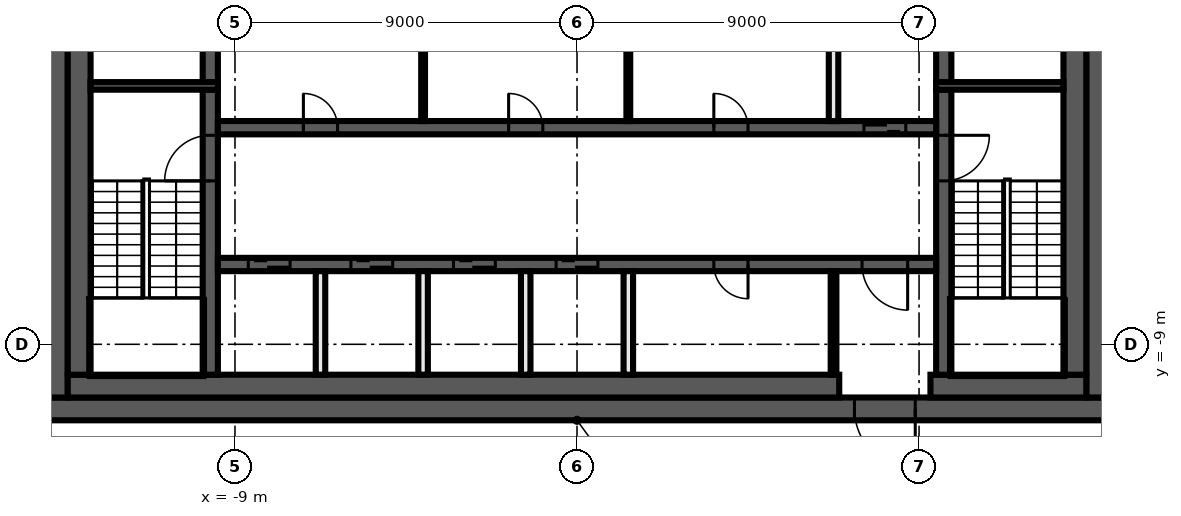
"""IFC4 building model, lengths in metres.
Left out: names, types, materials, properties, quantities, classifications, styles, units other than length and angle.
Written with IfcOpenShell. Run it as: python <this file> out.ifc"""

import sys

from ifc_helpers import new_model, si_unit, direction, frame, frame_2d, origin, place, context, subcontext, project, spatial, rectangle, extrude, element, fill, save


model = new_model("IFC4")
c1 = context("Model", 3, precision=1e-05, world=origin(), true_north=direction((0.0, 1.0)))
c2 = subcontext(c1, "Body", "Model", "MODEL_VIEW")
j1 = project(units=[si_unit("LENGTHUNIT", "METRE"), si_unit("PLANEANGLEUNIT", "RADIAN")], contexts=[c1])
p1 = place(None, origin())
s1 = spatial("IfcSite", under=j1, at=p1, CompositionType="ELEMENT")
p2 = place(p1, origin())
s2 = spatial("IfcBuilding", under=s1, at=p2, CompositionType="ELEMENT")
p3 = place(p2, frame((0.0, 0.0, 327.8)))
s3 = spatial("IfcBuildingStorey", under=s2, at=p3, CompositionType="ELEMENT", Elevation=327.8)
p4 = place(p3, frame((14.0, -10.7, 0.0), z_axis=(0.0, 0.0, 1.0), x_axis=(-1.0, 0.0, 0.0)))
e1 = element("IfcWall", 1, at=p4, inside=s3, PredefinedType="SHEAR", context=c2, shape_type="SweptSolid", body=[
    extrude(rectangle(XDim=28.0, YDim=0.6, at=frame_2d((14.0, 0.0))), origin(), (0.0, 0.0, 1.0), 3.82),
])
p5 = place(p4, frame((5.1, 0.0, 0.0)))
e2 = element("IfcOpeningElement", 2, at=p5, cuts=e1, PredefinedType="OPENING", context=c2, shape_type="SweptSolid", body=[
    extrude(rectangle(XDim=1.6, YDim=2.1, at=frame_2d((0.8, 1.05))), frame((0.0, 0.31, 0.0), z_axis=(0.0, -1.0, 0.0), x_axis=(1.0, 0.0, 0.0)), (0.0, 0.0, 1.0), 0.62),
])
for number, where, z_axis, x_axis in (
    (3, (13.7, 10.4, 0.0), (0.0, 0.0, 1.0), (0.0, -1.0, 0.0)),
    (4, (-13.7, -10.4, 0.0), (0.0, 0.0, 1.0), (0.0, 1.0, 0.0)),
):
    element("IfcWall", number, at=place(p3, frame(where, z_axis=z_axis, x_axis=x_axis)), inside=s3, PredefinedType="SHEAR", context=c2, shape_type="SweptSolid", body=[
        extrude(rectangle(XDim=20.8, YDim=0.6, at=frame_2d((10.4, 0.0))), origin(), (0.0, 0.0, 1.0), 3.82),
    ])
p6 = place(p3, frame((13.4, -10.1, 0.0), z_axis=(0.0, 0.0, 1.0), x_axis=(-1.0, 0.0, 0.0)))
e5 = element("IfcWall", 5, at=p6, inside=s3, PredefinedType="SHEAR", context=c2, shape_type="SweptSolid", body=[
    extrude(rectangle(XDim=4.1, YDim=0.6, at=frame_2d((2.05, 0.0))), origin(), (0.0, 0.0, 1.0), 3.82),
])
p7 = place(p3, frame((6.9, -10.1, 0.0), z_axis=(0.0, 0.0, 1.0), x_axis=(-1.0, 0.0, 0.0)))
e6 = element("IfcWall", 6, at=p7, inside=s3, PredefinedType="SHEAR", context=c2, shape_type="SweptSolid", body=[
    extrude(rectangle(XDim=20.3, YDim=0.6, at=frame_2d((10.15, 0.0))), origin(), (0.0, 0.0, 1.0), 3.82),
])
for number, where, z_axis, x_axis in (
    (7, (13.1, 9.8, 0.0), (0.0, 0.0, 1.0), (0.0, -1.0, 0.0)),
    (8, (-13.1, -9.8, 0.0), (0.0, 0.0, 1.0), (0.0, 1.0, 0.0)),
):
    element("IfcWall", number, at=place(p3, frame(where, z_axis=z_axis, x_axis=x_axis)), inside=s3, PredefinedType="SHEAR", context=c2, shape_type="SweptSolid", body=[
        extrude(rectangle(XDim=19.6, YDim=0.6, at=frame_2d((9.8, 0.0))), origin(), (0.0, 0.0, 1.0), 3.82),
    ])
p8 = place(p3, frame((9.65, -2.3, 0.0), z_axis=(0.0, 0.0, 1.0), x_axis=(0.0, -1.0, 0.0)))
e9 = element("IfcWall", 9, at=p8, inside=s3, PredefinedType="SHEAR", context=c2, shape_type="SweptSolid", body=[
    extrude(rectangle(XDim=7.5, YDim=0.4, at=frame_2d((3.75, 0.0))), origin(), (0.0, 0.0, 1.0), 3.82),
])
p9 = place(p8, frame((1.2, 0.0, 0.0)))
e10 = element("IfcOpeningElement", 10, at=p9, cuts=e9, PredefinedType="OPENING", context=c2, shape_type="SweptSolid", body=[
    extrude(rectangle(XDim=1.2, YDim=2.1, at=frame_2d((0.6, 1.05))), frame((0.0, 0.21, 0.0), z_axis=(0.0, -1.0, 0.0), x_axis=(1.0, 0.0, 0.0)), (0.0, 0.0, 1.0), 0.42),
])
p10 = place(p3, frame((9.65, 2.1, 0.0), z_axis=(0.0, 0.0, 1.0), x_axis=(0.0, -1.0, 0.0)))
e11 = element("IfcWall", 11, at=p10, inside=s3, PredefinedType="SHEAR", context=c2, shape_type="SweptSolid", body=[
    extrude(rectangle(XDim=4.2, YDim=0.4, at=frame_2d((2.1, 0.0))), origin(), (0.0, 0.0, 1.0), 3.82),
])
p11 = place(p10, frame((0.15, 0.0, 0.0)))
e12 = element("IfcOpeningElement", 12, at=p11, cuts=e11, PredefinedType="OPENING", context=c2, shape_type="SweptSolid", body=[
    extrude(rectangle(XDim=0.9, YDim=2.1, at=frame_2d((0.45, 1.05))), frame((0.0, 0.21, 0.0), z_axis=(0.0, -1.0, 0.0), x_axis=(1.0, 0.0, 0.0)), (0.0, 0.0, 1.0), 0.42),
])
p12 = place(p3, frame((-9.65, -9.8, 0.0), z_axis=(0.0, 0.0, 1.0), x_axis=(0.0, 1.0, 0.0)))
e13 = element("IfcWall", 13, at=p12, inside=s3, PredefinedType="SHEAR", context=c2, shape_type="SweptSolid", body=[
    extrude(rectangle(XDim=7.5, YDim=0.4, at=frame_2d((3.75, 0.0))), origin(), (0.0, 0.0, 1.0), 3.82),
])
p13 = place(p12, frame((5.1, 0.0, 0.0)))
e14 = element("IfcOpeningElement", 14, at=p13, cuts=e13, PredefinedType="OPENING", context=c2, shape_type="SweptSolid", body=[
    extrude(rectangle(XDim=1.2, YDim=2.1, at=frame_2d((0.6, 1.05))), frame((0.0, 0.21, 0.0), z_axis=(0.0, -1.0, 0.0), x_axis=(1.0, 0.0, 0.0)), (0.0, 0.0, 1.0), 0.42),
])
p14 = place(p3, frame((-9.65, -2.1, 0.0), z_axis=(0.0, 0.0, 1.0), x_axis=(0.0, 1.0, 0.0)))
e15 = element("IfcWall", 15, at=p14, inside=s3, PredefinedType="SHEAR", context=c2, shape_type="SweptSolid", body=[
    extrude(rectangle(XDim=4.2, YDim=0.4, at=frame_2d((2.1, 0.0))), origin(), (0.0, 0.0, 1.0), 3.82),
])
for number, where, z_axis, x_axis in (
    (16, (9.45, -2.2, 0.0), (0.0, 0.0, 1.0), (1.0, 0.0, 0.0)),
    (17, (-9.45, -2.2, 0.0), (0.0, 0.0, 1.0), (-1.0, 0.0, 0.0)),
):
    element("IfcWall", number, at=place(p3, frame(where, z_axis=z_axis, x_axis=x_axis)), inside=s3, PredefinedType="SHEAR", context=c2, shape_type="SweptSolid", body=[
        extrude(rectangle(XDim=3.35, YDim=0.2, at=frame_2d((1.675, 0.0))), origin(), (0.0, 0.0, 1.0), 3.82),
    ])
p15 = place(p3, frame((-9.45, -3.3, 0.0), z_axis=(0.0, 0.0, 1.0), x_axis=(1.0, 0.0, 0.0)))
e18 = element("IfcWall", 18, at=p15, inside=s3, PredefinedType="SHEAR", context=c2, shape_type="SweptSolid", body=[
    extrude(rectangle(XDim=18.9, YDim=0.35, at=frame_2d((9.45, 0.0))), origin(), (0.0, 0.0, 1.0), 3.82),
])
p16 = place(p15, frame((17.0, 0.0, 0.0)))
e19 = element("IfcOpeningElement", 19, at=p16, cuts=e18, PredefinedType="OPENING", context=c2, shape_type="SweptSolid", body=[
    extrude(rectangle(XDim=1.1, YDim=2.1, at=frame_2d((0.55, 1.05))), frame((0.0, 0.185, 0.0), z_axis=(0.0, -1.0, 0.0), x_axis=(1.0, 0.0, 0.0)), (0.0, 0.0, 1.0), 0.37),
])
p17 = place(p15, frame((2.25, 0.0, 0.0)))
e20 = element("IfcOpeningElement", 20, at=p17, cuts=e18, PredefinedType="OPENING", context=c2, shape_type="SweptSolid", body=[
    extrude(rectangle(XDim=0.9, YDim=2.1, at=frame_2d((0.45, 1.05))), frame((0.0, 0.185, 0.0), z_axis=(0.0, -1.0, 0.0), x_axis=(1.0, 0.0, 0.0)), (0.0, 0.0, 1.0), 0.37),
])
p18 = place(p15, frame((7.65, 0.0, 0.0)))
e21 = element("IfcOpeningElement", 21, at=p18, cuts=e18, PredefinedType="OPENING", context=c2, shape_type="SweptSolid", body=[
    extrude(rectangle(XDim=0.9, YDim=2.1, at=frame_2d((0.45, 1.05))), frame((0.0, 0.185, 0.0), z_axis=(0.0, -1.0, 0.0), x_axis=(1.0, 0.0, 0.0)), (0.0, 0.0, 1.0), 0.37),
])
p19 = place(p15, frame((13.05, 0.0, 0.0)))
e22 = element("IfcOpeningElement", 22, at=p19, cuts=e18, PredefinedType="OPENING", context=c2, shape_type="SweptSolid", body=[
    extrude(rectangle(XDim=0.9, YDim=2.1, at=frame_2d((0.45, 1.05))), frame((0.0, 0.185, 0.0), z_axis=(0.0, -1.0, 0.0), x_axis=(1.0, 0.0, 0.0)), (0.0, 0.0, 1.0), 0.37),
])
p20 = place(p3, frame((9.45, -6.9, 0.0), z_axis=(0.0, 0.0, 1.0), x_axis=(-1.0, 0.0, 0.0)))
e23 = element("IfcWall", 23, at=p20, inside=s3, PredefinedType="SHEAR", context=c2, shape_type="SweptSolid", body=[
    extrude(rectangle(XDim=18.9, YDim=0.35, at=frame_2d((9.45, 0.0))), origin(), (0.0, 0.0, 1.0), 3.82),
])
p21 = place(p20, frame((17.0, 0.0, 0.0)))
e24 = element("IfcOpeningElement", 24, at=p21, cuts=e23, PredefinedType="OPENING", context=c2, shape_type="SweptSolid", body=[
    extrude(rectangle(XDim=1.1, YDim=2.1, at=frame_2d((0.55, 1.05))), frame((0.0, 0.185, 0.0), z_axis=(0.0, -1.0, 0.0), x_axis=(1.0, 0.0, 0.0)), (0.0, 0.0, 1.0), 0.37),
])
p22 = place(p20, frame((14.3, 0.0, 0.0)))
e25 = element("IfcOpeningElement", 25, at=p22, cuts=e23, PredefinedType="OPENING", context=c2, shape_type="SweptSolid", body=[
    extrude(rectangle(XDim=1.1, YDim=2.1, at=frame_2d((0.55, 1.05))), frame((0.0, 0.185, 0.0), z_axis=(0.0, -1.0, 0.0), x_axis=(1.0, 0.0, 0.0)), (0.0, 0.0, 1.0), 0.37),
])
p23 = place(p20, frame((11.6, 0.0, 0.0)))
e26 = element("IfcOpeningElement", 26, at=p23, cuts=e23, PredefinedType="OPENING", context=c2, shape_type="SweptSolid", body=[
    extrude(rectangle(XDim=1.1, YDim=2.1, at=frame_2d((0.55, 1.05))), frame((0.0, 0.185, 0.0), z_axis=(0.0, -1.0, 0.0), x_axis=(1.0, 0.0, 0.0)), (0.0, 0.0, 1.0), 0.37),
])
p24 = place(p20, frame((8.9, 0.0, 0.0)))
e27 = element("IfcOpeningElement", 27, at=p24, cuts=e23, PredefinedType="OPENING", context=c2, shape_type="SweptSolid", body=[
    extrude(rectangle(XDim=1.1, YDim=2.1, at=frame_2d((0.55, 1.05))), frame((0.0, 0.185, 0.0), z_axis=(0.0, -1.0, 0.0), x_axis=(1.0, 0.0, 0.0)), (0.0, 0.0, 1.0), 0.37),
])
p25 = place(p20, frame((0.75, 0.0, 0.0)))
e28 = element("IfcOpeningElement", 28, at=p25, cuts=e23, PredefinedType="OPENING", context=c2, shape_type="SweptSolid", body=[
    extrude(rectangle(XDim=1.2, YDim=2.1, at=frame_2d((0.6, 1.05))), frame((0.0, 0.185, 0.0), z_axis=(0.0, -1.0, 0.0), x_axis=(1.0, 0.0, 0.0)), (0.0, 0.0, 1.0), 0.37),
])
p26 = place(p20, frame((4.95, 0.0, 0.0)))
e29 = element("IfcOpeningElement", 29, at=p26, cuts=e23, PredefinedType="OPENING", context=c2, shape_type="SweptSolid", body=[
    extrude(rectangle(XDim=0.9, YDim=2.1, at=frame_2d((0.45, 1.05))), frame((0.0, 0.185, 0.0), z_axis=(0.0, -1.0, 0.0), x_axis=(1.0, 0.0, 0.0)), (0.0, 0.0, 1.0), 0.37),
])
p27 = place(p3, frame((6.75, -9.8, 0.0), z_axis=(0.0, 0.0, 1.0), x_axis=(0.0, 1.0, 0.0)))
e30 = element("IfcWall", 30, at=p27, inside=s3, PredefinedType="PARTITIONING", context=c2, shape_type="SweptSolid", body=[
    extrude(rectangle(XDim=2.725, YDim=0.15, at=frame_2d((1.363, 0.0))), origin(), (0.0, 0.0, 1.0), 3.82),
])
p28 = place(p3, frame((6.75, -3.125, 0.0), z_axis=(0.0, 0.0, 1.0), x_axis=(0.0, 1.0, 0.0)))
e31 = element("IfcWall", 31, at=p28, inside=s3, PredefinedType="SOLIDWALL", context=c2, shape_type="SweptSolid", body=[
    extrude(rectangle(XDim=2.725, YDim=0.25, at=frame_2d((1.363, 0.0))), origin(), (0.0, 0.0, 1.0), 3.82),
])
p29 = place(p3, frame((1.35, -3.125, 0.0), z_axis=(0.0, 0.0, 1.0), x_axis=(0.0, 1.0, 0.0)))
e32 = element("IfcWall", 32, at=p29, inside=s3, PredefinedType="PARTITIONING", context=c2, shape_type="SweptSolid", body=[
    extrude(rectangle(XDim=2.725, YDim=0.1, at=frame_2d((1.363, 0.0))), origin(), (0.0, 0.0, 1.0), 3.82),
])
for number, where, z_axis, x_axis in (
    (33, (1.35, -9.8, 0.0), (0.0, 0.0, 1.0), (0.0, 1.0, 0.0)),
    (34, (-1.35, -9.8, 0.0), (0.0, 0.0, 1.0), (0.0, 1.0, 0.0)),
):
    element("IfcWall", number, at=place(p3, frame(where, z_axis=z_axis, x_axis=x_axis)), inside=s3, PredefinedType="SOLIDWALL", context=c2, shape_type="SweptSolid", body=[
        extrude(rectangle(XDim=2.725, YDim=0.25, at=frame_2d((1.363, 0.0))), origin(), (0.0, 0.0, 1.0), 3.82),
    ])
p30 = place(p3, frame((-4.05, -3.125, 0.0), z_axis=(0.0, 0.0, 1.0), x_axis=(0.0, 1.0, 0.0)))
e35 = element("IfcWall", 35, at=p30, inside=s3, PredefinedType="PARTITIONING", context=c2, shape_type="SweptSolid", body=[
    extrude(rectangle(XDim=2.725, YDim=0.1, at=frame_2d((1.363, 0.0))), origin(), (0.0, 0.0, 1.0), 3.82),
])
for number, where, z_axis, x_axis in (
    (36, (-4.05, -9.8, 0.0), (0.0, 0.0, 1.0), (0.0, 1.0, 0.0)),
    (37, (-6.75, -9.8, 0.0), (0.0, 0.0, 1.0), (0.0, 1.0, 0.0)),
):
    element("IfcWall", number, at=place(p3, frame(where, z_axis=z_axis, x_axis=x_axis)), inside=s3, PredefinedType="SOLIDWALL", context=c2, shape_type="SweptSolid", body=[
        extrude(rectangle(XDim=2.725, YDim=0.25, at=frame_2d((1.363, 0.0))), origin(), (0.0, 0.0, 1.0), 3.82),
    ])
p31 = place(p16, origin())
e38 = element("IfcDoor", 38, at=p31, inside=s3, OperationType="DOUBLE_DOOR_SLIDING", PredefinedType="DOOR", context=c2, shape_type="SweptSolid", body=[
    extrude(rectangle(XDim=1.1, YDim=2.1, at=frame_2d((0.55, 1.05))), frame((0.0, 0.025, 0.0), z_axis=(0.0, -1.0, 0.0), x_axis=(1.0, 0.0, 0.0)), (0.0, 0.0, 1.0), 0.05),
])
fill(e19, e38)
p32 = place(p21, origin())
e39 = element("IfcDoor", 39, at=p32, inside=s3, OperationType="DOUBLE_DOOR_SLIDING", PredefinedType="DOOR", context=c2, shape_type="SweptSolid", body=[
    extrude(rectangle(XDim=1.1, YDim=2.1, at=frame_2d((0.55, 1.05))), frame((0.0, 0.025, 0.0), z_axis=(0.0, -1.0, 0.0), x_axis=(1.0, 0.0, 0.0)), (0.0, 0.0, 1.0), 0.05),
])
fill(e24, e39)
p33 = place(p22, origin())
e40 = element("IfcDoor", 40, at=p33, inside=s3, OperationType="DOUBLE_DOOR_SLIDING", PredefinedType="DOOR", context=c2, shape_type="SweptSolid", body=[
    extrude(rectangle(XDim=1.1, YDim=2.1, at=frame_2d((0.55, 1.05))), frame((0.0, 0.025, 0.0), z_axis=(0.0, -1.0, 0.0), x_axis=(1.0, 0.0, 0.0)), (0.0, 0.0, 1.0), 0.05),
])
fill(e25, e40)
p34 = place(p23, origin())
e41 = element("IfcDoor", 41, at=p34, inside=s3, OperationType="DOUBLE_DOOR_SLIDING", PredefinedType="DOOR", context=c2, shape_type="SweptSolid", body=[
    extrude(rectangle(XDim=1.1, YDim=2.1, at=frame_2d((0.55, 1.05))), frame((0.0, 0.025, 0.0), z_axis=(0.0, -1.0, 0.0), x_axis=(1.0, 0.0, 0.0)), (0.0, 0.0, 1.0), 0.05),
])
fill(e26, e41)
p35 = place(p24, origin())
e42 = element("IfcDoor", 42, at=p35, inside=s3, OperationType="DOUBLE_DOOR_SLIDING", PredefinedType="DOOR", context=c2, shape_type="SweptSolid", body=[
    extrude(rectangle(XDim=1.1, YDim=2.1, at=frame_2d((0.55, 1.05))), frame((0.0, 0.025, 0.0), z_axis=(0.0, -1.0, 0.0), x_axis=(1.0, 0.0, 0.0)), (0.0, 0.0, 1.0), 0.05),
])
fill(e27, e42)
p36 = place(p5, origin())
e43 = element("IfcDoor", 43, at=p36, inside=s3, OperationType="DOUBLE_DOOR_SINGLE_SWING", PredefinedType="DOOR", context=c2, shape_type="SweptSolid", body=[
    extrude(rectangle(XDim=1.6, YDim=2.1, at=frame_2d((0.8, 1.05))), frame((0.0, 0.025, 0.0), z_axis=(0.0, -1.0, 0.0), x_axis=(1.0, 0.0, 0.0)), (0.0, 0.0, 1.0), 0.05),
])
fill(e2, e43)
p37 = place(p25, origin())
e44 = element("IfcDoor", 44, at=p37, inside=s3, OperationType="SINGLE_SWING_LEFT", PredefinedType="DOOR", context=c2, shape_type="SweptSolid", body=[
    extrude(rectangle(XDim=1.2, YDim=2.1, at=frame_2d((0.6, 1.05))), frame((0.0, 0.025, 0.0), z_axis=(0.0, -1.0, 0.0), x_axis=(1.0, 0.0, 0.0)), (0.0, 0.0, 1.0), 0.05),
])
fill(e28, e44)
p38 = place(p17, origin())
e45 = element("IfcDoor", 45, at=p38, inside=s3, OperationType="SINGLE_SWING_LEFT", PredefinedType="DOOR", context=c2, shape_type="SweptSolid", body=[
    extrude(rectangle(XDim=0.9, YDim=2.1, at=frame_2d((0.45, 1.05))), frame((0.0, 0.025, 0.0), z_axis=(0.0, -1.0, 0.0), x_axis=(1.0, 0.0, 0.0)), (0.0, 0.0, 1.0), 0.05),
])
fill(e20, e45)
p39 = place(p18, origin())
e46 = element("IfcDoor", 46, at=p39, inside=s3, OperationType="SINGLE_SWING_RIGHT", PredefinedType="DOOR", context=c2, shape_type="SweptSolid", body=[
    extrude(rectangle(XDim=0.9, YDim=2.1, at=frame_2d((0.45, 1.05))), frame((0.0, 0.025, 0.0), z_axis=(0.0, -1.0, 0.0), x_axis=(1.0, 0.0, 0.0)), (0.0, 0.0, 1.0), 0.05),
])
fill(e21, e46)
p40 = place(p19, origin())
e47 = element("IfcDoor", 47, at=p40, inside=s3, OperationType="SINGLE_SWING_LEFT", PredefinedType="DOOR", context=c2, shape_type="SweptSolid", body=[
    extrude(rectangle(XDim=0.9, YDim=2.1, at=frame_2d((0.45, 1.05))), frame((0.0, 0.025, 0.0), z_axis=(0.0, -1.0, 0.0), x_axis=(1.0, 0.0, 0.0)), (0.0, 0.0, 1.0), 0.05),
])
fill(e22, e47)
p41 = place(p26, origin())
e48 = element("IfcDoor", 48, at=p41, inside=s3, OperationType="SINGLE_SWING_RIGHT", PredefinedType="DOOR", context=c2, shape_type="SweptSolid", body=[
    extrude(rectangle(XDim=0.9, YDim=2.1, at=frame_2d((0.45, 1.05))), frame((0.0, 0.025, 0.0), z_axis=(0.0, -1.0, 0.0), x_axis=(1.0, 0.0, 0.0)), (0.0, 0.0, 1.0), 0.05),
])
fill(e29, e48)
p42 = place(p9, origin())
e49 = element("IfcDoor", 49, at=p42, inside=s3, OperationType="SINGLE_SWING_RIGHT", PredefinedType="DOOR", context=c2, shape_type="SweptSolid", body=[
    extrude(rectangle(XDim=1.2, YDim=2.1, at=frame_2d((0.6, 1.05))), frame((0.0, 0.025, 0.0), z_axis=(0.0, -1.0, 0.0), x_axis=(1.0, 0.0, 0.0)), (0.0, 0.0, 1.0), 0.05),
])
fill(e10, e49)
p43 = place(p13, origin())
e50 = element("IfcDoor", 50, at=p43, inside=s3, OperationType="SINGLE_SWING_LEFT", PredefinedType="DOOR", context=c2, shape_type="SweptSolid", body=[
    extrude(rectangle(XDim=1.2, YDim=2.1, at=frame_2d((0.6, 1.05))), frame((0.0, 0.025, 0.0), z_axis=(0.0, -1.0, 0.0), x_axis=(1.0, 0.0, 0.0)), (0.0, 0.0, 1.0), 0.05),
])
fill(e14, e50)
save(model, sys.argv[1])
